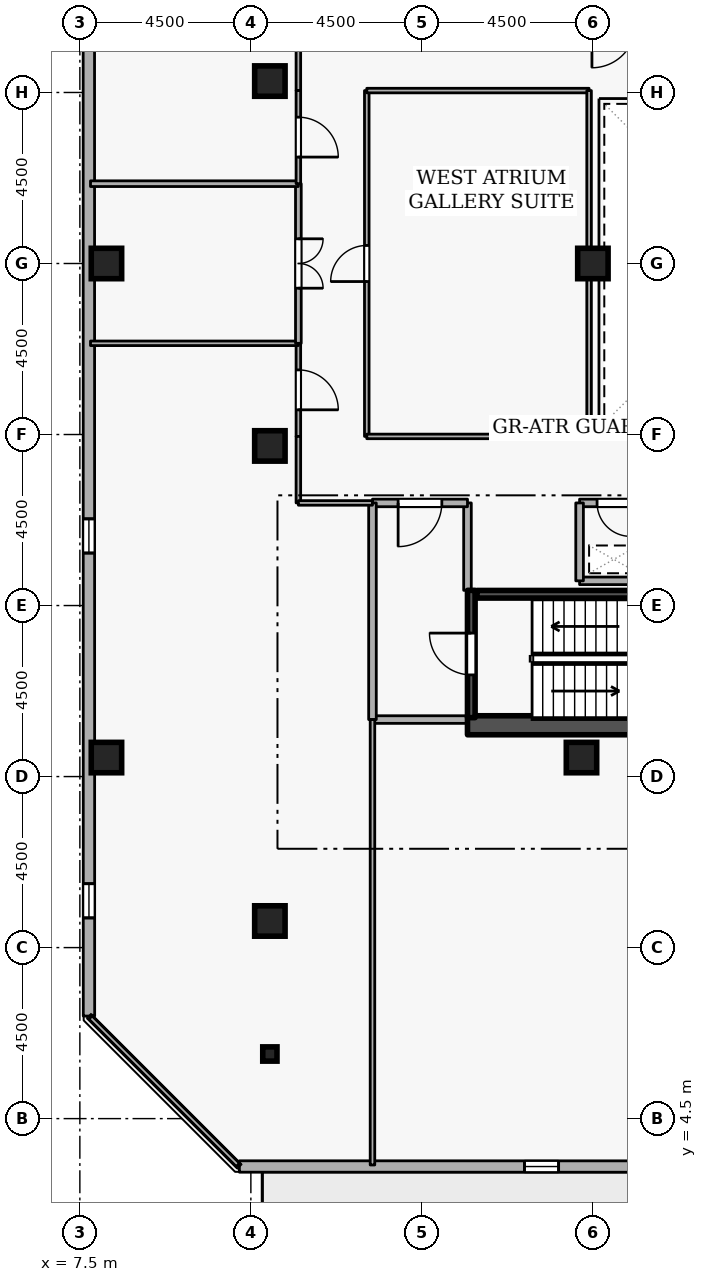
"""IFC4 building model, lengths in metres.
Left out: names, types, materials, properties, quantities, classifications, styles, units other than length and angle.
Written with IfcOpenShell. Run it as: python <this file> out.ifc"""

import sys

from ifc_helpers import new_model, si_unit, direction, frame, frame_2d, origin, origin_2d, place, context, subcontext, project, spatial, rectangle, i_section, extrude, element, fill, save


model = new_model("IFC4")
c1 = context("Model", 3, precision=1e-05, world=origin(), true_north=direction((0.0, 1.0)))
c2 = subcontext(c1, "Body", "Model", "MODEL_VIEW")
j1 = project(units=[si_unit("LENGTHUNIT", "METRE"), si_unit("PLANEANGLEUNIT", "RADIAN")], contexts=[c1])
p1 = place(None, origin())
s1 = spatial("IfcSite", under=j1, at=p1, CompositionType="ELEMENT")
p2 = place(p1, origin())
s2 = spatial("IfcBuilding", under=s1, at=p2, CompositionType="ELEMENT")
p3 = place(p2, frame((0.0, 0.0, 258.3)))
s3 = spatial("IfcBuildingStorey", under=s2, at=p3, CompositionType="ELEMENT", Elevation=258.3)
p4 = place(p3, frame((17.7, 14.85, 0.0), z_axis=(0.0, 0.0, 1.0), x_axis=(1.0, 0.0, 0.0)))
e1 = element("IfcWall", 1, at=p4, inside=s3, PredefinedType="SHEAR", context=c2, shape_type="SweptSolid", body=[
    extrude(rectangle(XDim=15.6, YDim=0.5, at=frame_2d((7.8, 0.0))), origin(), (0.0, 0.0, 1.0), 3.6),
])
for number, where, z_axis, x_axis in (
    (2, (12.5, 9.7, 0.0), (0.0, 0.0, 1.0), (1.0, 0.0, 0.0)),
    (3, (8.2, 14.0, 0.0), (0.0, 0.0, 1.0), (1.0, 0.0, 0.0)),
    (4, (8.2, 27.0, 0.0), (0.0, 0.0, 1.0), (1.0, 0.0, 0.0)),
    (5, (12.5, 22.2, 0.0), (0.0, 0.0, 1.0), (1.0, 0.0, 0.0)),
    (6, (12.5, 31.8, 0.0), (0.0, 0.0, 1.0), (1.0, 0.0, 0.0)),
    (7, (20.7, 14.0, 0.0), (0.0, 0.0, 1.0), (1.0, 0.0, 0.0)),
    (8, (21.0, 27.0, 0.0), (0.0, 0.0, 1.0), (1.0, 0.0, 0.0)),
):
    element("IfcColumn", number, at=place(p3, frame(where, z_axis=z_axis, x_axis=x_axis)), inside=s3, PredefinedType="COLUMN", context=c2, shape_type="SweptSolid", body=[
        extrude(rectangle(XDim=0.8, YDim=0.8, at=origin_2d()), origin(), (0.0, 0.0, 1.0), 3.6),
    ])
p5 = place(p3, frame((12.5, 6.2, 0.0), z_axis=(0.0, 0.0, 1.0), x_axis=(1.0, 0.0, 0.0)))
e9 = element("IfcColumn", 9, at=p5, inside=s3, PredefinedType="COLUMN", context=c2, shape_type="SweptSolid", body=[
    extrude(i_section(OverallWidth=0.375, OverallDepth=0.375, WebThickness=0.017, FlangeThickness=0.027, FilletRadius=0.015, at=origin_2d()), origin(), (0.0, 0.0, 1.0), 3.6),
])
p6 = place(p3, frame((11.698, 3.24, 0.0), z_axis=(0.0, 0.0, 1.0), x_axis=(0.999999991209, -0.000132597301, 0.0)))
e10 = element("IfcWall", 10, at=p6, inside=s3, PredefinedType="STANDARD", context=c2, shape_type="SweptSolid", body=[
    extrude(rectangle(XDim=34.983, YDim=0.3, at=frame_2d((17.492, 0.0))), origin(), (0.0, 0.0, 1.0), 2.7),
])
p7 = place(p6, frame((21.992, 0.0, 0.0)))
e11 = element("IfcOpeningElement", 11, at=p7, cuts=e10, PredefinedType="OPENING", context=c2, shape_type="SweptSolid", body=[
    extrude(rectangle(XDim=1.0, YDim=2.08, at=frame_2d((0.5, 1.04))), frame((0.0, 0.16, 0.0), z_axis=(0.0, -1.0, 0.0), x_axis=(1.0, 0.0, 0.0)), (0.0, 0.0, 1.0), 0.32),
])
p8 = place(p6, frame((7.5, 0.0, 0.72)))
e12 = element("IfcOpeningElement", 12, at=p8, cuts=e10, PredefinedType="OPENING", context=c2, shape_type="SweptSolid", body=[
    extrude(rectangle(XDim=0.9, YDim=1.75, at=frame_2d((0.45, 0.875))), frame((0.0, 0.16, 0.0), z_axis=(0.0, -1.0, 0.0), x_axis=(1.0, 0.0, 0.0)), (0.0, 0.0, 1.0), 0.32),
])
p9 = place(p6, frame((12.3, 0.0, 0.72)))
e13 = element("IfcOpeningElement", 13, at=p9, cuts=e10, PredefinedType="OPENING", context=c2, shape_type="SweptSolid", body=[
    extrude(rectangle(XDim=0.9, YDim=1.75, at=frame_2d((0.45, 0.875))), frame((0.0, 0.16, 0.0), z_axis=(0.0, -1.0, 0.0), x_axis=(1.0, 0.0, 0.0)), (0.0, 0.0, 1.0), 0.32),
])
p10 = place(p6, frame((17.1, 0.0, 0.72)))
e14 = element("IfcOpeningElement", 14, at=p10, cuts=e10, PredefinedType="OPENING", context=c2, shape_type="SweptSolid", body=[
    extrude(rectangle(XDim=0.9, YDim=1.75, at=frame_2d((0.45, 0.875))), frame((0.0, 0.16, 0.0), z_axis=(0.0, -1.0, 0.0), x_axis=(1.0, 0.0, 0.0)), (0.0, 0.0, 1.0), 0.32),
])
p11 = place(p6, frame((26.7, 0.0, 0.72)))
e15 = element("IfcOpeningElement", 15, at=p11, cuts=e10, PredefinedType="OPENING", context=c2, shape_type="SweptSolid", body=[
    extrude(rectangle(XDim=0.9, YDim=1.75, at=frame_2d((0.45, 0.875))), frame((0.0, 0.16, 0.0), z_axis=(0.0, -1.0, 0.0), x_axis=(1.0, 0.0, 0.0)), (0.0, 0.0, 1.0), 0.32),
])
p12 = place(p6, frame((31.5, 0.0, 0.72)))
e16 = element("IfcOpeningElement", 16, at=p12, cuts=e10, PredefinedType="OPENING", context=c2, shape_type="SweptSolid", body=[
    extrude(rectangle(XDim=0.9, YDim=1.75, at=frame_2d((0.45, 0.875))), frame((0.0, 0.16, 0.0), z_axis=(0.0, -1.0, 0.0), x_axis=(1.0, 0.0, 0.0)), (0.0, 0.0, 1.0), 0.32),
])
p13 = place(p3, frame((7.735, 42.181, 0.0), z_axis=(0.0, 0.0, 1.0), x_axis=(0.000132597301, -0.999999991209, 0.0)))
e17 = element("IfcWall", 17, at=p13, inside=s3, PredefinedType="STANDARD", context=c2, shape_type="SweptSolid", body=[
    extrude(rectangle(XDim=34.983, YDim=0.3, at=frame_2d((17.492, 0.0))), origin(), (0.0, 0.0, 1.0), 2.7),
])
p14 = place(p13, frame((7.5, 0.0, 0.72)))
e18 = element("IfcOpeningElement", 18, at=p14, cuts=e17, PredefinedType="OPENING", context=c2, shape_type="SweptSolid", body=[
    extrude(rectangle(XDim=0.9, YDim=1.75, at=frame_2d((0.45, 0.875))), frame((0.0, 0.16, 0.0), z_axis=(0.0, -1.0, 0.0), x_axis=(1.0, 0.0, 0.0)), (0.0, 0.0, 1.0), 0.32),
])
p15 = place(p13, frame((21.9, 0.0, 0.72)))
e19 = element("IfcOpeningElement", 19, at=p15, cuts=e17, PredefinedType="OPENING", context=c2, shape_type="SweptSolid", body=[
    extrude(rectangle(XDim=0.9, YDim=1.75, at=frame_2d((0.45, 0.875))), frame((0.0, 0.16, 0.0), z_axis=(0.0, -1.0, 0.0), x_axis=(1.0, 0.0, 0.0)), (0.0, 0.0, 1.0), 0.32),
])
p16 = place(p13, frame((31.5, 0.0, 0.72)))
e20 = element("IfcOpeningElement", 20, at=p16, cuts=e17, PredefinedType="OPENING", context=c2, shape_type="SweptSolid", body=[
    extrude(rectangle(XDim=0.9, YDim=1.75, at=frame_2d((0.45, 0.875))), frame((0.0, 0.16, 0.0), z_axis=(0.0, -1.0, 0.0), x_axis=(1.0, 0.0, 0.0)), (0.0, 0.0, 1.0), 0.32),
])
p17 = place(p3, frame((17.8, 15.05, 0.0), z_axis=(0.0, 0.0, 1.0), x_axis=(0.0, 1.0, 0.0)))
e21 = element("IfcWall", 21, at=p17, inside=s3, PredefinedType="SHEAR", context=c2, shape_type="SweptSolid", body=[
    extrude(rectangle(XDim=3.35, YDim=0.2, at=frame_2d((1.675, 0.0))), origin(), (0.0, 0.0, 1.0), 3.6),
])
p18 = place(p17, frame((1.125, 0.0, 0.0)))
e22 = element("IfcOpeningElement", 22, at=p18, cuts=e21, PredefinedType="OPENING", context=c2, shape_type="SweptSolid", body=[
    extrude(rectangle(XDim=1.1, YDim=2.1, at=frame_2d((0.55, 1.05))), frame((0.0, 0.11, 0.0), z_axis=(0.0, -1.0, 0.0), x_axis=(1.0, 0.0, 0.0)), (0.0, 0.0, 1.0), 0.22),
])
p19 = place(p3, frame((25.05, 18.297, 0.0), z_axis=(0.0, 0.0, 1.0), x_axis=(-1.0, 0.0, 0.0)))
e23 = element("IfcWall", 23, at=p19, inside=s3, PredefinedType="SHEAR", context=c2, shape_type="SweptSolid", body=[
    extrude(rectangle(XDim=7.1, YDim=0.2, at=frame_2d((3.55, 0.0))), origin(), (0.0, 0.0, 1.0), 3.6),
])
p20 = place(p3, frame((15.2, 15.0, 0.0), z_axis=(0.0, 0.0, 1.0), x_axis=(1.0, 0.0, 0.0)))
e24 = element("IfcWall", 24, at=p20, inside=s3, PredefinedType="STANDARD", context=c2, shape_type="SweptSolid", body=[
    extrude(rectangle(XDim=2.5, YDim=0.2, at=frame_2d((1.25, 0.0))), origin(), (0.0, 0.0, 1.0), 3.34),
])
p21 = place(p3, frame((17.7, 18.4, 0.0), z_axis=(0.0, 0.0, 1.0), x_axis=(0.0, 1.0, 0.0)))
e25 = element("IfcWall", 25, at=p21, inside=s3, PredefinedType="STANDARD", context=c2, shape_type="SweptSolid", body=[
    extrude(rectangle(XDim=2.3, YDim=0.2, at=frame_2d((1.15, 0.0))), origin(), (0.0, 0.0, 1.0), 2.545),
])
p22 = place(p3, frame((17.7, 20.7, 0.0), z_axis=(0.0, 0.0, 1.0), x_axis=(-1.0, 0.0, 0.0)))
e26 = element("IfcWall", 26, at=p22, inside=s3, PredefinedType="STANDARD", context=c2, shape_type="SweptSolid", body=[
    extrude(rectangle(XDim=2.5, YDim=0.2, at=frame_2d((1.25, 0.0))), origin(), (0.0, 0.0, 1.0), 3.34),
])
p23 = place(p22, frame((0.675, 0.0, 0.0)))
e27 = element("IfcOpeningElement", 27, at=p23, cuts=e26, PredefinedType="OPENING", context=c2, shape_type="SweptSolid", body=[
    extrude(rectangle(XDim=1.15, YDim=2.1, at=frame_2d((0.575, 1.05))), frame((0.0, 0.11, 0.0), z_axis=(0.0, -1.0, 0.0), x_axis=(1.0, 0.0, 0.0)), (0.0, 0.0, 1.0), 0.22),
])
p24 = place(p3, frame((15.2, 20.7, 0.0), z_axis=(0.0, 0.0, 1.0), x_axis=(0.0, -1.0, 0.0)))
e28 = element("IfcWall", 28, at=p24, inside=s3, PredefinedType="STANDARD", context=c2, shape_type="SweptSolid", body=[
    extrude(rectangle(XDim=5.7, YDim=0.2, at=frame_2d((2.85, 0.0))), origin(), (0.0, 0.0, 1.0), 3.34),
])
p25 = place(p3, frame((20.65, 18.65, 0.0), z_axis=(0.0, 0.0, 1.0), x_axis=(1.0, 0.0, 0.0)))
e29 = element("IfcWall", 29, at=p25, inside=s3, PredefinedType="STANDARD", context=c2, shape_type="SweptSolid", body=[
    extrude(rectangle(XDim=1.8, YDim=0.2, at=frame_2d((0.9, 0.0))), origin(), (0.0, 0.0, 1.0), 3.34),
])
p26 = place(p3, frame((22.45, 20.7, 0.0), z_axis=(0.0, 0.0, 1.0), x_axis=(-1.0, 0.0, 0.0)))
e30 = element("IfcWall", 30, at=p26, inside=s3, PredefinedType="STANDARD", context=c2, shape_type="SweptSolid", body=[
    extrude(rectangle(XDim=1.8, YDim=0.2, at=frame_2d((0.9, 0.0))), origin(), (0.0, 0.0, 1.0), 3.34),
])
p27 = place(p26, frame((0.46, 0.0, 0.0)))
e31 = element("IfcOpeningElement", 31, at=p27, cuts=e30, PredefinedType="OPENING", context=c2, shape_type="SweptSolid", body=[
    extrude(rectangle(XDim=0.88, YDim=2.04, at=frame_2d((0.44, 1.02))), frame((0.0, 0.11, 0.0), z_axis=(0.0, -1.0, 0.0), x_axis=(1.0, 0.0, 0.0)), (0.0, 0.0, 1.0), 0.22),
])
p28 = place(p3, frame((20.65, 20.7, 0.0), z_axis=(0.0, 0.0, 1.0), x_axis=(0.0, -1.0, 0.0)))
e32 = element("IfcWall", 32, at=p28, inside=s3, PredefinedType="STANDARD", context=c2, shape_type="SweptSolid", body=[
    extrude(rectangle(XDim=2.05, YDim=0.2, at=frame_2d((1.025, 0.0))), origin(), (0.0, 0.0, 1.0), 3.34),
])
p29 = place(p3, frame((13.25, 24.9, 0.0), z_axis=(0.0, 0.0, 1.0), x_axis=(0.0, -1.0, 0.0)))
e33 = element("IfcWall", 33, at=p29, inside=s3, PredefinedType="PARTITIONING", context=c2, shape_type="SweptSolid", body=[
    extrude(rectangle(XDim=2.45, YDim=0.12, at=frame_2d((1.225, 0.0))), origin(), (0.0, 0.0, 1.0), 3.34),
])
p30 = place(p29, frame((0.7, 0.0, 0.0)))
e34 = element("IfcOpeningElement", 34, at=p30, cuts=e33, PredefinedType="OPENING", context=c2, shape_type="SweptSolid", body=[
    extrude(rectangle(XDim=1.05, YDim=2.1, at=frame_2d((0.525, 1.05))), frame((0.0, 0.07, 0.0), z_axis=(0.0, -1.0, 0.0), x_axis=(1.0, 0.0, 0.0)), (0.0, 0.0, 1.0), 0.14),
])
p31 = place(p3, frame((13.25, 22.45, 0.0), z_axis=(0.0, 0.0, 1.0), x_axis=(0.0, -1.0, 0.0)))
e35 = element("IfcWall", 35, at=p31, inside=s3, PredefinedType="PARTITIONING", context=c2, shape_type="SweptSolid", body=[
    extrude(rectangle(XDim=1.75, YDim=0.12, at=frame_2d((0.875, 0.0))), origin(), (0.0, 0.0, 1.0), 3.34),
])
p32 = place(p3, frame((13.25, 20.7, 0.0), z_axis=(0.0, 0.0, 1.0), x_axis=(1.0, 0.0, 0.0)))
e36 = element("IfcWall", 36, at=p32, inside=s3, PredefinedType="PARTITIONING", context=c2, shape_type="SweptSolid", body=[
    extrude(rectangle(XDim=1.95, YDim=0.12, at=frame_2d((0.975, 0.0))), origin(), (0.0, 0.0, 1.0), 3.34),
])
p33 = place(p3, frame((15.2, 15.0, 0.0), z_axis=(0.0, 0.0, 1.0), x_axis=(0.0, -1.0, 0.0)))
e37 = element("IfcWall", 37, at=p33, inside=s3, PredefinedType="PARTITIONING", context=c2, shape_type="SweptSolid", body=[
    extrude(rectangle(XDim=11.72, YDim=0.12, at=frame_2d((5.86, 0.0))), origin(), (0.0, 0.0, 1.0), 3.34),
])
p34 = place(p3, frame((11.66, 3.28, 0.0), z_axis=(0.0, 0.0, 1.0), x_axis=(-0.707106781187, 0.707106781187, 0.0)))
e38 = element("IfcWall", 38, at=p34, inside=s3, PredefinedType="PARTITIONING", context=c2, shape_type="SweptSolid", body=[
    extrude(rectangle(XDim=5.487, YDim=0.12, at=frame_2d((2.743, 0.0))), origin(), (0.0, 0.0, 1.0), 3.34),
])
p35 = place(p3, frame((7.78, 24.9, 0.0), z_axis=(0.0, 0.0, 1.0), x_axis=(1.0, 0.0, 0.0)))
e39 = element("IfcWall", 39, at=p35, inside=s3, PredefinedType="PARTITIONING", context=c2, shape_type="SweptSolid", body=[
    extrude(rectangle(XDim=5.47, YDim=0.12, at=frame_2d((2.735, 0.0))), origin(), (0.0, 0.0, 1.0), 3.34),
])
p36 = place(p3, frame((13.25, 29.1, 0.0), z_axis=(0.0, 0.0, 1.0), x_axis=(0.0, -1.0, 0.0)))
e40 = element("IfcWall", 40, at=p36, inside=s3, PredefinedType="PARTITIONING", context=c2, shape_type="SweptSolid", body=[
    extrude(rectangle(XDim=4.2, YDim=0.15, at=frame_2d((2.1, 0.0))), origin(), (0.0, 0.0, 1.0), 3.34),
])
p37 = place(p36, frame((1.45, 0.0, 0.0)))
e41 = element("IfcOpeningElement", 41, at=p37, cuts=e40, PredefinedType="OPENING", context=c2, shape_type="SweptSolid", body=[
    extrude(rectangle(XDim=1.3, YDim=2.12, at=frame_2d((0.65, 1.06))), frame((0.0, 0.085, 0.0), z_axis=(0.0, -1.0, 0.0), x_axis=(1.0, 0.0, 0.0)), (0.0, 0.0, 1.0), 0.17),
])
p38 = place(p3, frame((7.78, 29.1, 0.0), z_axis=(0.0, 0.0, 1.0), x_axis=(1.0, 0.0, 0.0)))
e42 = element("IfcWall", 42, at=p38, inside=s3, PredefinedType="PARTITIONING", context=c2, shape_type="SweptSolid", body=[
    extrude(rectangle(XDim=5.47, YDim=0.15, at=frame_2d((2.735, 0.0))), origin(), (0.0, 0.0, 1.0), 3.34),
])
p39 = place(p3, frame((13.25, 33.3, 0.0), z_axis=(0.0, 0.0, 1.0), x_axis=(0.0, -1.0, 0.0)))
e43 = element("IfcWall", 43, at=p39, inside=s3, PredefinedType="PARTITIONING", context=c2, shape_type="SweptSolid", body=[
    extrude(rectangle(XDim=1.75, YDim=0.12, at=frame_2d((0.875, 0.0))), origin(), (0.0, 0.0, 1.0), 3.34),
])
p40 = place(p3, frame((13.25, 31.55, 0.0), z_axis=(0.0, 0.0, 1.0), x_axis=(0.0, -1.0, 0.0)))
e44 = element("IfcWall", 44, at=p40, inside=s3, PredefinedType="PARTITIONING", context=c2, shape_type="SweptSolid", body=[
    extrude(rectangle(XDim=2.45, YDim=0.12, at=frame_2d((1.225, 0.0))), origin(), (0.0, 0.0, 1.0), 3.34),
])
p41 = place(p40, frame((0.7, 0.0, 0.0)))
e45 = element("IfcOpeningElement", 45, at=p41, cuts=e44, PredefinedType="OPENING", context=c2, shape_type="SweptSolid", body=[
    extrude(rectangle(XDim=1.05, YDim=2.1, at=frame_2d((0.525, 1.05))), frame((0.0, 0.07, 0.0), z_axis=(0.0, -1.0, 0.0), x_axis=(1.0, 0.0, 0.0)), (0.0, 0.0, 1.0), 0.14),
])
p42 = place(p3, frame((15.05, 22.45, 0.0), z_axis=(0.0, 0.0, 1.0), x_axis=(0.0, 1.0, 0.0)))
e46 = element("IfcWall", 46, at=p42, inside=s3, PredefinedType="PARTITIONING", context=c2, shape_type="SweptSolid", body=[
    extrude(rectangle(XDim=9.1, YDim=0.12, at=frame_2d((4.55, 0.0))), origin(), (0.0, 0.0, 1.0), 3.34),
])
p43 = place(p42, frame((4.075, 0.0, 0.0)))
e47 = element("IfcOpeningElement", 47, at=p43, cuts=e46, PredefinedType="OPENING", context=c2, shape_type="SweptSolid", body=[
    extrude(rectangle(XDim=0.95, YDim=2.1, at=frame_2d((0.475, 1.05))), frame((0.0, 0.07, 0.0), z_axis=(0.0, -1.0, 0.0), x_axis=(1.0, 0.0, 0.0)), (0.0, 0.0, 1.0), 0.14),
])
p44 = place(p3, frame((15.05, 31.55, 0.0), z_axis=(0.0, 0.0, 1.0), x_axis=(1.0, 0.0, 0.0)))
e48 = element("IfcWall", 48, at=p44, inside=s3, PredefinedType="PARTITIONING", context=c2, shape_type="SweptSolid", body=[
    extrude(rectangle(XDim=5.85, YDim=0.12, at=frame_2d((2.925, 0.0))), origin(), (0.0, 0.0, 1.0), 3.34),
])
p45 = place(p3, frame((20.9, 31.55, 0.0), z_axis=(0.0, 0.0, 1.0), x_axis=(0.0, -1.0, 0.0)))
e49 = element("IfcWall", 49, at=p45, inside=s3, PredefinedType="PARTITIONING", context=c2, shape_type="SweptSolid", body=[
    extrude(rectangle(XDim=9.1, YDim=0.12, at=frame_2d((4.55, 0.0))), origin(), (0.0, 0.0, 1.0), 3.34),
])
p46 = place(p3, frame((20.9, 22.45, 0.0), z_axis=(0.0, 0.0, 1.0), x_axis=(-1.0, 0.0, 0.0)))
e50 = element("IfcWall", 50, at=p46, inside=s3, PredefinedType="PARTITIONING", context=c2, shape_type="SweptSolid", body=[
    extrude(rectangle(XDim=5.85, YDim=0.12, at=frame_2d((2.925, 0.0))), origin(), (0.0, 0.0, 1.0), 3.34),
])
p47 = place(p8, origin())
e51 = element("IfcWindow", 51, at=p47, inside=s3, PartitioningType="SINGLE_PANEL", PredefinedType="WINDOW", context=c2, shape_type="SweptSolid", body=[
    extrude(rectangle(XDim=0.9, YDim=1.75, at=frame_2d((0.45, 0.875))), frame((0.0, 0.03, 0.0), z_axis=(0.0, -1.0, 0.0), x_axis=(1.0, 0.0, 0.0)), (0.0, 0.0, 1.0), 0.06),
])
fill(e12, e51)
p48 = place(p15, origin())
e52 = element("IfcWindow", 52, at=p48, inside=s3, PartitioningType="SINGLE_PANEL", PredefinedType="WINDOW", context=c2, shape_type="SweptSolid", body=[
    extrude(rectangle(XDim=0.9, YDim=1.75, at=frame_2d((0.45, 0.875))), frame((0.0, 0.03, 0.0), z_axis=(0.0, -1.0, 0.0), x_axis=(1.0, 0.0, 0.0)), (0.0, 0.0, 1.0), 0.06),
])
fill(e19, e52)
p49 = place(p16, origin())
e53 = element("IfcWindow", 53, at=p49, inside=s3, PartitioningType="SINGLE_PANEL", PredefinedType="WINDOW", context=c2, shape_type="SweptSolid", body=[
    extrude(rectangle(XDim=0.9, YDim=1.75, at=frame_2d((0.45, 0.875))), frame((0.0, 0.03, 0.0), z_axis=(0.0, -1.0, 0.0), x_axis=(1.0, 0.0, 0.0)), (0.0, 0.0, 1.0), 0.06),
])
fill(e20, e53)
p50 = place(p18, origin())
e54 = element("IfcDoor", 54, at=p50, inside=s3, OperationType="SINGLE_SWING_RIGHT", PredefinedType="DOOR", context=c2, shape_type="SweptSolid", body=[
    extrude(rectangle(XDim=1.1, YDim=2.1, at=frame_2d((0.55, 1.05))), frame((0.0, 0.025, 0.0), z_axis=(0.0, -1.0, 0.0), x_axis=(1.0, 0.0, 0.0)), (0.0, 0.0, 1.0), 0.05),
])
fill(e22, e54)
p51 = place(p23, origin())
e55 = element("IfcDoor", 55, at=p51, inside=s3, OperationType="SINGLE_SWING_RIGHT", PredefinedType="DOOR", context=c2, shape_type="SweptSolid", body=[
    extrude(rectangle(XDim=1.15, YDim=2.1, at=frame_2d((0.575, 1.05))), frame((0.0, 0.025, 0.0), z_axis=(0.0, -1.0, 0.0), x_axis=(1.0, 0.0, 0.0)), (0.0, 0.0, 1.0), 0.05),
])
fill(e27, e55)
p52 = place(p27, origin())
e56 = element("IfcDoor", 56, at=p52, inside=s3, OperationType="SINGLE_SWING_LEFT", PredefinedType="DOOR", context=c2, shape_type="SweptSolid", body=[
    extrude(rectangle(XDim=0.88, YDim=2.04, at=frame_2d((0.44, 1.02))), frame((0.0, 0.025, 0.0), z_axis=(0.0, -1.0, 0.0), x_axis=(1.0, 0.0, 0.0)), (0.0, 0.0, 1.0), 0.05),
])
fill(e31, e56)
p53 = place(p30, origin())
e57 = element("IfcDoor", 57, at=p53, inside=s3, OperationType="SINGLE_SWING_RIGHT", PredefinedType="DOOR", context=c2, shape_type="SweptSolid", body=[
    extrude(rectangle(XDim=1.05, YDim=2.1, at=frame_2d((0.525, 1.05))), frame((0.0, 0.025, 0.0), z_axis=(0.0, -1.0, 0.0), x_axis=(1.0, 0.0, 0.0)), (0.0, 0.0, 1.0), 0.05),
])
fill(e34, e57)
p54 = place(p37, origin())
e58 = element("IfcDoor", 58, at=p54, inside=s3, OperationType="DOUBLE_DOOR_SINGLE_SWING", PredefinedType="DOOR", context=c2, shape_type="SweptSolid", body=[
    extrude(rectangle(XDim=1.3, YDim=2.12, at=frame_2d((0.65, 1.06))), frame((0.0, 0.025, 0.0), z_axis=(0.0, -1.0, 0.0), x_axis=(1.0, 0.0, 0.0)), (0.0, 0.0, 1.0), 0.05),
])
fill(e41, e58)
p55 = place(p41, origin())
e59 = element("IfcDoor", 59, at=p55, inside=s3, OperationType="SINGLE_SWING_RIGHT", PredefinedType="DOOR", context=c2, shape_type="SweptSolid", body=[
    extrude(rectangle(XDim=1.05, YDim=2.1, at=frame_2d((0.525, 1.05))), frame((0.0, 0.025, 0.0), z_axis=(0.0, -1.0, 0.0), x_axis=(1.0, 0.0, 0.0)), (0.0, 0.0, 1.0), 0.05),
])
fill(e45, e59)
p56 = place(p43, origin())
e60 = element("IfcDoor", 60, at=p56, inside=s3, OperationType="SINGLE_SWING_LEFT", PredefinedType="DOOR", context=c2, shape_type="SweptSolid", body=[
    extrude(rectangle(XDim=0.95, YDim=2.1, at=frame_2d((0.475, 1.05))), frame((0.0, 0.025, 0.0), z_axis=(0.0, -1.0, 0.0), x_axis=(1.0, 0.0, 0.0)), (0.0, 0.0, 1.0), 0.05),
])
fill(e47, e60)
save(model, sys.argv[1])
